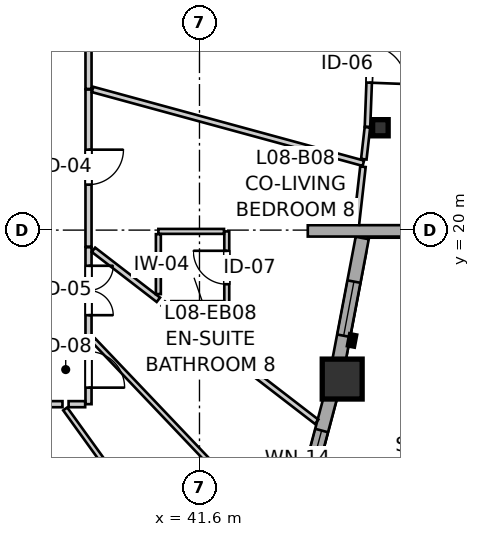
"""IFC4 building model, lengths in metres.
Left out: names, types, materials, properties, quantities, classifications, styles, units other than length and angle.
Written with IfcOpenShell. Run it as: python <this file> out.ifc"""

import sys

from ifc_helpers import new_model, si_unit, direction, frame, frame_2d, origin, origin_2d, place, context, subcontext, project, spatial, rectangle, i_section, extrude, source, transform, mapped, element, fill, save


model = new_model("IFC4")
c1 = context("Model", 3, precision=1e-05, world=origin(), true_north=direction((0.0, 1.0)))
c2 = subcontext(c1, "Body", "Model", "MODEL_VIEW")
j1 = project(units=[si_unit("LENGTHUNIT", "METRE"), si_unit("PLANEANGLEUNIT", "RADIAN")], contexts=[c1])
p1 = place(None, origin())
s1 = spatial("IfcSite", under=j1, at=p1, CompositionType="ELEMENT")
p2 = place(p1, origin())
s2 = spatial("IfcBuilding", under=s1, at=p2, CompositionType="ELEMENT")
p3 = place(p2, frame((0.0, 0.0, 30.2)))
s3 = spatial("IfcBuildingStorey", under=s2, at=p3, CompositionType="ELEMENT", Elevation=30.2)
m1 = source(origin(), c2, "Body", "SweptSolid", [
    extrude(rectangle(XDim=1.05, YDim=1.05, at=origin_2d()), origin(), (0.0, 0.0, 1.0), 2.935),
])
p4 = place(p3, frame((45.355, 16.081, 0.0), z_axis=(0.0, 0.0, 1.0), x_axis=(1.0, 0.0, 0.0)))
e1 = element("IfcColumn", 1, at=p4, inside=s3, PredefinedType="COLUMN", context=c2, shape_type="MappedRepresentation", body=[
    mapped(m1, transform((0.0, 0.0, 0.0), x_axis=(1.0, 0.0, 0.0), y_axis=(0.0, 1.0, 0.0), z_axis=(0.0, 0.0, 1.0), scale=1.0)),
])
m2 = source(origin(), c2, "Body", "SweptSolid", [
    extrude(i_section(OverallWidth=0.409, OverallDepth=0.425, WebThickness=0.03, FlangeThickness=0.048, FilletRadius=0.015, at=origin_2d()), origin(), (0.0, 0.0, 1.0), 2.935),
])
p5 = place(p3, frame((46.361, 22.694, 0.0), z_axis=(0.0, 0.0, 1.0), x_axis=(1.0, 0.0, 0.0)))
e2 = element("IfcColumn", 2, at=p5, inside=s3, PredefinedType="PILASTER", context=c2, shape_type="MappedRepresentation", body=[
    mapped(m2, transform((0.0, 0.0, 0.0), x_axis=(1.0, 0.0, 0.0), y_axis=(0.0, 1.0, 0.0), z_axis=(0.0, 0.0, 1.0), scale=1.0)),
])
p6 = place(p3, frame((44.297, 12.782, 0.0), z_axis=(0.0, 0.0, 1.0), x_axis=(0.257090265476, 0.96638739406, 0.0)))
e3 = element("IfcWall", 3, at=p6, inside=s3, PredefinedType="SOLIDWALL", context=c2, shape_type="SweptSolid", body=[
    extrude(rectangle(XDim=3.159, YDim=0.35, at=frame_2d((1.58, 0.0))), origin(), (0.0, 0.0, 1.0), 2.415),
])
p7 = place(p6, frame((0.261, 0.0, 0.82)))
e4 = element("IfcOpeningElement", 4, at=p7, cuts=e3, PredefinedType="OPENING", context=c2, shape_type="SweptSolid", body=[
    extrude(rectangle(XDim=1.75, YDim=1.3, at=frame_2d((0.875, 0.65))), frame((0.0, 0.185, 0.0), z_axis=(0.0, -1.0, 0.0), x_axis=(1.0, 0.0, 0.0)), (0.0, 0.0, 1.0), 0.37),
])
p8 = place(p3, frame((45.24, 16.408, 0.0), z_axis=(0.0, 0.0, 1.0), x_axis=(0.186636709983, 0.982428999209, 0.0)))
e5 = element("IfcWall", 5, at=p8, inside=s3, PredefinedType="SOLIDWALL", context=c2, shape_type="SweptSolid", body=[
    extrude(rectangle(XDim=3.446, YDim=0.35, at=frame_2d((1.723, 0.0))), origin(), (0.0, 0.0, 1.0), 2.415),
])
p9 = place(p8, frame((0.828, 0.0, 0.82)))
e6 = element("IfcOpeningElement", 6, at=p9, cuts=e5, PredefinedType="OPENING", context=c2, shape_type="SweptSolid", body=[
    extrude(rectangle(XDim=1.45, YDim=1.25, at=frame_2d((0.725, 0.625))), frame((0.0, 0.185, 0.0), z_axis=(0.0, -1.0, 0.0), x_axis=(1.0, 0.0, 0.0)), (0.0, 0.0, 1.0), 0.37),
])
p10 = place(p3, frame((44.45, 19.98, 0.0), z_axis=(0.0, 0.0, 1.0), x_axis=(1.0, 0.0, 0.0)))
e7 = element("IfcWall", 7, at=p10, inside=s3, PredefinedType="SOLIDWALL", context=c2, shape_type="SweptSolid", body=[
    extrude(rectangle(XDim=20.685, YDim=0.3, at=frame_2d((10.342, 0.0))), origin(), (0.0, 0.0, 1.0), 2.115),
])
p11 = place(p3, frame((38.68, 28.445, 0.0), z_axis=(0.0, 0.0, 1.0), x_axis=(0.0, -1.0, 0.0)))
e8 = element("IfcWall", 8, at=p11, inside=s3, PredefinedType="PARTITIONING", context=c2, shape_type="SweptSolid", body=[
    extrude(rectangle(XDim=4.731, YDim=0.16, at=frame_2d((2.365, 0.0))), origin(), (0.0, 0.0, 1.0), 2.935),
])
p12 = place(p11, frame((1.716, 0.0, 0.0)))
e9 = element("IfcOpeningElement", 9, at=p12, cuts=e8, PredefinedType="OPENING", context=c2, shape_type="SweptSolid", body=[
    extrude(rectangle(XDim=1.3, YDim=2.1, at=frame_2d((0.65, 1.05))), frame((0.0, 0.09, 0.0), z_axis=(0.0, -1.0, 0.0), x_axis=(1.0, 0.0, 0.0)), (0.0, 0.0, 1.0), 0.18),
])
p13 = place(p3, frame((38.68, 23.699, 0.0), z_axis=(0.0, 0.0, 1.0), x_axis=(0.0, -1.0, 0.0)))
e10 = element("IfcWall", 10, at=p13, inside=s3, PredefinedType="PARTITIONING", context=c2, shape_type="SweptSolid", body=[
    extrude(rectangle(XDim=4.135, YDim=0.16, at=frame_2d((2.067, 0.0))), origin(), (0.0, 0.0, 1.0), 2.935),
])
p14 = place(p13, frame((1.583, 0.0, 0.0)))
e11 = element("IfcOpeningElement", 11, at=p14, cuts=e10, PredefinedType="OPENING", context=c2, shape_type="SweptSolid", body=[
    extrude(rectangle(XDim=0.92, YDim=2.1, at=frame_2d((0.46, 1.05))), frame((0.0, 0.09, 0.0), z_axis=(0.0, -1.0, 0.0), x_axis=(1.0, 0.0, 0.0)), (0.0, 0.0, 1.0), 0.18),
])
p15 = place(p3, frame((46.146, 25.985, 0.0), z_axis=(0.0, 0.0, 1.0), x_axis=(-0.038094618751, -0.999274136572, 0.0)))
e12 = element("IfcWall", 12, at=p15, inside=s3, PredefinedType="PARTITIONING", context=c2, shape_type="SweptSolid", body=[
    extrude(rectangle(XDim=3.269, YDim=0.145, at=frame_2d((1.634, 0.0))), origin(), (0.0, 0.0, 1.0), 2.403),
])
p16 = place(p15, frame((1.147, 0.0, 0.0)))
e13 = element("IfcOpeningElement", 13, at=p16, cuts=e12, PredefinedType="OPENING", context=c2, shape_type="SweptSolid", body=[
    extrude(rectangle(XDim=0.96, YDim=2.1, at=frame_2d((0.48, 1.05))), frame((0.0, 0.083, 0.0), z_axis=(0.0, -1.0, 0.0), x_axis=(1.0, 0.0, 0.0)), (0.0, 0.0, 1.0), 0.165),
])
p17 = place(p3, frame((37.995, 15.42, 0.0), z_axis=(0.0, 0.0, 1.0), x_axis=(-1.0, 0.0, 0.0)))
e14 = element("IfcWall", 14, at=p17, inside=s3, PredefinedType="PARTITIONING", context=c2, shape_type="SweptSolid", body=[
    extrude(rectangle(XDim=2.9, YDim=0.16, at=frame_2d((1.45, 0.0))), origin(), (0.0, 0.0, 1.0), 2.935),
])
p18 = place(p17, frame((1.014, 0.0, 0.0)))
e15 = element("IfcOpeningElement", 15, at=p18, cuts=e14, PredefinedType="OPENING", context=c2, shape_type="SweptSolid", body=[
    extrude(rectangle(XDim=0.92, YDim=2.1, at=frame_2d((0.46, 1.05))), frame((0.0, 0.09, 0.0), z_axis=(0.0, -1.0, 0.0), x_axis=(1.0, 0.0, 0.0)), (0.0, 0.0, 1.0), 0.18),
])
p19 = place(p3, frame((38.68, 19.549, 0.0), z_axis=(0.0, 0.0, 1.0), x_axis=(0.0, -1.0, 0.0)))
e16 = element("IfcWall", 16, at=p19, inside=s3, PredefinedType="PARTITIONING", context=c2, shape_type="SweptSolid", body=[
    extrude(rectangle(XDim=2.331, YDim=0.16, at=frame_2d((1.166, 0.0))), origin(), (0.0, 0.0, 1.0), 2.935),
])
p20 = place(p19, frame((0.488, 0.0, 0.0)))
e17 = element("IfcOpeningElement", 17, at=p20, cuts=e16, PredefinedType="OPENING", context=c2, shape_type="SweptSolid", body=[
    extrude(rectangle(XDim=1.3, YDim=2.1, at=frame_2d((0.65, 1.05))), frame((0.0, 0.09, 0.0), z_axis=(0.0, -1.0, 0.0), x_axis=(1.0, 0.0, 0.0)), (0.0, 0.0, 1.0), 0.18),
])
p21 = place(p3, frame((42.318, 18.066, 0.0), z_axis=(0.0, 0.0, 1.0), x_axis=(0.0, 1.0, 0.0)))
e18 = element("IfcWall", 18, at=p21, inside=s3, PredefinedType="PARTITIONING", context=c2, shape_type="SweptSolid", body=[
    extrude(rectangle(XDim=1.9, YDim=0.13, at=frame_2d((0.95, 0.0))), origin(), (0.0, 0.0, 1.0), 2.935),
])
p22 = place(p21, frame((0.51, 0.0, 0.0)))
e19 = element("IfcOpeningElement", 19, at=p22, cuts=e18, PredefinedType="OPENING", context=c2, shape_type="SweptSolid", body=[
    extrude(rectangle(XDim=0.88, YDim=2.05, at=frame_2d((0.44, 1.025))), frame((0.0, 0.075, 0.0), z_axis=(0.0, -1.0, 0.0), x_axis=(1.0, 0.0, 0.0)), (0.0, 0.0, 1.0), 0.15),
])
p23 = place(p3, frame((38.68, 17.203, 0.0), z_axis=(0.0, 0.0, 1.0), x_axis=(0.0, -1.0, 0.0)))
e20 = element("IfcWall", 20, at=p23, inside=s3, PredefinedType="PARTITIONING", context=c2, shape_type="SweptSolid", body=[
    extrude(rectangle(XDim=1.783, YDim=0.16, at=frame_2d((0.892, 0.0))), origin(), (0.0, 0.0, 1.0), 2.935),
])
p24 = place(p23, frame((0.398, 0.0, 0.0)))
e21 = element("IfcOpeningElement", 21, at=p24, cuts=e20, PredefinedType="OPENING", context=c2, shape_type="SweptSolid", body=[
    extrude(rectangle(XDim=0.95, YDim=2.1, at=frame_2d((0.475, 1.05))), frame((0.0, 0.09, 0.0), z_axis=(0.0, -1.0, 0.0), x_axis=(1.0, 0.0, 0.0)), (0.0, 0.0, 1.0), 0.18),
])
p25 = place(p3, frame((38.067, 15.295, 0.0), z_axis=(0.0, 0.0, 1.0), x_axis=(0.584777320582, -0.811193864211, 0.0)))
e22 = element("IfcWall", 22, at=p25, inside=s3, PredefinedType="PARTITIONING", context=c2, shape_type="SweptSolid", body=[
    extrude(rectangle(XDim=8.164, YDim=0.13, at=frame_2d((4.082, 0.0))), origin(), (0.0, 0.0, 1.0), 2.935),
])
p26 = place(p3, frame((38.787, 23.701, 0.0), z_axis=(0.0, 0.0, 1.0), x_axis=(0.964810342249, -0.262946769308, 0.0)))
e23 = element("IfcWall", 23, at=p26, inside=s3, PredefinedType="PARTITIONING", context=c2, shape_type="SweptSolid", body=[
    extrude(rectangle(XDim=7.385, YDim=0.145, at=frame_2d((3.692, 0.0))), origin(), (0.0, 0.0, 1.0), 2.935),
])
p27 = place(p3, frame((38.812, 17.101, 0.0), z_axis=(0.0, 0.0, 1.0), x_axis=(0.689140556814, -0.724627692649, 0.0)))
e24 = element("IfcWall", 24, at=p27, inside=s3, PredefinedType="PARTITIONING", context=c2, shape_type="SweptSolid", body=[
    extrude(rectangle(XDim=7.217, YDim=0.13, at=frame_2d((3.608, 0.0))), origin(), (0.0, 0.0, 1.0), 2.935),
])
p28 = place(p3, frame((40.649, 18.066, 0.0), z_axis=(0.0, 0.0, 1.0), x_axis=(0.792155051101, -0.610319895641, 0.0)))
e25 = element("IfcWall", 25, at=p28, inside=s3, PredefinedType="PARTITIONING", context=c2, shape_type="SweptSolid", body=[
    extrude(rectangle(XDim=5.093, YDim=0.145, at=frame_2d((2.546, 0.0))), origin(), (0.0, 0.0, 1.0), 2.935),
])
p29 = place(p3, frame((38.811, 19.482, 0.0), z_axis=(0.0, 0.0, 1.0), x_axis=(0.792185877025, -0.61027988353, 0.0)))
e26 = element("IfcWall", 26, at=p29, inside=s3, PredefinedType="PARTITIONING", context=c2, shape_type="SweptSolid", body=[
    extrude(rectangle(XDim=2.156, YDim=0.145, at=frame_2d((1.078, 0.0))), origin(), (0.0, 0.0, 1.0), 2.935),
])
p30 = place(p3, frame((40.518, 19.966, 0.0), z_axis=(0.0, 0.0, 1.0), x_axis=(1.0, 0.0, 0.0)))
e27 = element("IfcWall", 27, at=p30, inside=s3, PredefinedType="PARTITIONING", context=c2, shape_type="SweptSolid", body=[
    extrude(rectangle(XDim=1.727, YDim=0.13, at=frame_2d((0.864, 0.0))), origin(), (0.0, 0.0, 1.0), 2.103),
])
p31 = place(p3, frame((40.518, 18.317, 0.0), z_axis=(0.0, 0.0, 1.0), x_axis=(0.0, 1.0, 0.0)))
e28 = element("IfcWall", 28, at=p31, inside=s3, PredefinedType="PARTITIONING", context=c2, shape_type="SweptSolid", body=[
    extrude(rectangle(XDim=1.576, YDim=0.13, at=frame_2d((0.788, 0.0))), origin(), (0.0, 0.0, 1.0), 2.935),
])
p32 = place(p3, frame((40.86, 18.066, 0.0), z_axis=(0.0, 0.0, 1.0), x_axis=(1.0, 0.0, 0.0)))
e29 = element("IfcWall", 29, at=p32, inside=s3, PredefinedType="PARTITIONING", context=c2, shape_type="SweptSolid", body=[
    extrude(rectangle(XDim=1.385, YDim=0.13, at=frame_2d((0.692, 0.0))), origin(), (0.0, 0.0, 1.0), 2.935),
])
p33 = place(p3, frame((45.729, 20.146, 0.0), z_axis=(0.0, 0.0, 1.0), x_axis=(0.113074294354, 0.993586535716, 0.0)))
e30 = element("IfcWall", 30, at=p33, inside=s3, PredefinedType="PARTITIONING", context=c2, shape_type="SweptSolid", body=[
    extrude(rectangle(XDim=1.531, YDim=0.145, at=frame_2d((0.765, 0.0))), origin(), (0.0, 0.0, 1.0), 2.403),
])
p34 = place(p3, frame((45.924, 21.866, 0.0), z_axis=(0.0, 0.0, 1.0), x_axis=(0.112844765803, 0.993612630169, 0.0)))
e31 = element("IfcWall", 31, at=p34, inside=s3, PredefinedType="PARTITIONING", context=c2, shape_type="SweptSolid", body=[
    extrude(rectangle(XDim=0.844, YDim=0.145, at=frame_2d((0.422, 0.0))), origin(), (0.0, 0.0, 1.0), 2.403),
])
p35 = place(p3, frame((38.156, 15.42, 0.0), z_axis=(0.0, 0.0, 1.0), x_axis=(1.0, 0.0, 0.0)))
e32 = element("IfcWall", 32, at=p35, inside=s3, PredefinedType="PARTITIONING", context=c2, shape_type="SweptSolid", body=[
    extrude(rectangle(XDim=0.436, YDim=0.16, at=frame_2d((0.218, 0.0))), origin(), (0.0, 0.0, 1.0), 2.935),
])
m3 = source(origin(), c2, "Body", "SweptSolid", [
    extrude(rectangle(XDim=1.75, YDim=1.3, at=frame_2d((0.875, 0.65))), frame((0.0, 0.03, 0.0), z_axis=(0.0, -1.0, 0.0), x_axis=(1.0, 0.0, 0.0)), (0.0, 0.0, 1.0), 0.06),
])
p36 = place(p7, origin())
e33 = element("IfcWindow", 33, at=p36, inside=s3, PartitioningType="SINGLE_PANEL", PredefinedType="WINDOW", context=c2, shape_type="MappedRepresentation", body=[
    mapped(m3, transform((0.0, 0.0, 0.0), x_axis=(1.0, 0.0, 0.0), y_axis=(0.0, 1.0, 0.0), z_axis=(0.0, 0.0, 1.0), scale=1.0)),
])
fill(e4, e33)
m4 = source(origin(), c2, "Body", "SweptSolid", [
    extrude(rectangle(XDim=1.45, YDim=1.25, at=frame_2d((0.725, 0.625))), frame((0.0, 0.03, 0.0), z_axis=(0.0, -1.0, 0.0), x_axis=(1.0, 0.0, 0.0)), (0.0, 0.0, 1.0), 0.06),
])
p37 = place(p9, origin())
e34 = element("IfcWindow", 34, at=p37, inside=s3, PartitioningType="SINGLE_PANEL", PredefinedType="WINDOW", context=c2, shape_type="MappedRepresentation", body=[
    mapped(m4, transform((0.0, 0.0, 0.0), x_axis=(1.0, 0.0, 0.0), y_axis=(0.0, 1.0, 0.0), z_axis=(0.0, 0.0, 1.0), scale=1.0)),
])
fill(e6, e34)
m5 = source(origin(), c2, "Body", "SweptSolid", [
    extrude(rectangle(XDim=0.92, YDim=2.1, at=frame_2d((0.46, 1.05))), frame((0.0, 0.025, 0.0), z_axis=(0.0, -1.0, 0.0), x_axis=(1.0, 0.0, 0.0)), (0.0, 0.0, 1.0), 0.05),
])
p38 = place(p14, origin())
e35 = element("IfcDoor", 35, at=p38, inside=s3, OperationType="SINGLE_SWING_LEFT", PredefinedType="DOOR", context=c2, shape_type="MappedRepresentation", body=[
    mapped(m5, transform((0.0, 0.0, 0.0), x_axis=(1.0, 0.0, 0.0), y_axis=(0.0, 1.0, 0.0), z_axis=(0.0, 0.0, 1.0), scale=1.0)),
])
fill(e11, e35)
m6 = source(origin(), c2, "Body", "SweptSolid", [
    extrude(rectangle(XDim=0.96, YDim=2.1, at=frame_2d((0.48, 1.05))), frame((0.0, 0.025, 0.0), z_axis=(0.0, -1.0, 0.0), x_axis=(1.0, 0.0, 0.0)), (0.0, 0.0, 1.0), 0.05),
])
p39 = place(p16, origin())
e36 = element("IfcDoor", 36, at=p39, inside=s3, OperationType="SINGLE_SWING_RIGHT", PredefinedType="DOOR", context=c2, shape_type="MappedRepresentation", body=[
    mapped(m6, transform((0.0, 0.0, 0.0), x_axis=(1.0, 0.0, 0.0), y_axis=(0.0, 1.0, 0.0), z_axis=(0.0, 0.0, 1.0), scale=1.0)),
])
fill(e13, e36)
m7 = source(origin(), c2, "Body", "SweptSolid", [
    extrude(rectangle(XDim=1.3, YDim=2.1, at=frame_2d((0.65, 1.05))), frame((0.0, 0.025, 0.0), z_axis=(0.0, -1.0, 0.0), x_axis=(1.0, 0.0, 0.0)), (0.0, 0.0, 1.0), 0.05),
])
p40 = place(p20, origin())
e37 = element("IfcDoor", 37, at=p40, inside=s3, OperationType="DOUBLE_DOOR_SINGLE_SWING", PredefinedType="DOOR", context=c2, shape_type="MappedRepresentation", body=[
    mapped(m7, transform((0.0, 0.0, 0.0), x_axis=(1.0, 0.0, 0.0), y_axis=(0.0, 1.0, 0.0), z_axis=(0.0, 0.0, 1.0), scale=1.0)),
])
fill(e17, e37)
m8 = source(origin(), c2, "Body", "SweptSolid", [
    extrude(rectangle(XDim=0.88, YDim=2.05, at=frame_2d((0.44, 1.025))), frame((0.0, 0.025, 0.0), z_axis=(0.0, -1.0, 0.0), x_axis=(1.0, 0.0, 0.0)), (0.0, 0.0, 1.0), 0.05),
])
p41 = place(p22, origin())
e38 = element("IfcDoor", 38, at=p41, inside=s3, OperationType="SINGLE_SWING_RIGHT", PredefinedType="DOOR", context=c2, shape_type="MappedRepresentation", body=[
    mapped(m8, transform((0.0, 0.0, 0.0), x_axis=(1.0, 0.0, 0.0), y_axis=(0.0, 1.0, 0.0), z_axis=(0.0, 0.0, 1.0), scale=1.0)),
])
fill(e19, e38)
m9 = source(origin(), c2, "Body", "SweptSolid", [
    extrude(rectangle(XDim=0.95, YDim=2.1, at=frame_2d((0.475, 1.05))), frame((0.0, 0.025, 0.0), z_axis=(0.0, -1.0, 0.0), x_axis=(1.0, 0.0, 0.0)), (0.0, 0.0, 1.0), 0.05),
])
p42 = place(p24, origin())
e39 = element("IfcDoor", 39, at=p42, inside=s3, OperationType="SINGLE_SWING_RIGHT", PredefinedType="DOOR", context=c2, shape_type="MappedRepresentation", body=[
    mapped(m9, transform((0.0, 0.0, 0.0), x_axis=(1.0, 0.0, 0.0), y_axis=(0.0, 1.0, 0.0), z_axis=(0.0, 0.0, 1.0), scale=1.0)),
])
fill(e21, e39)
save(model, sys.argv[1])
